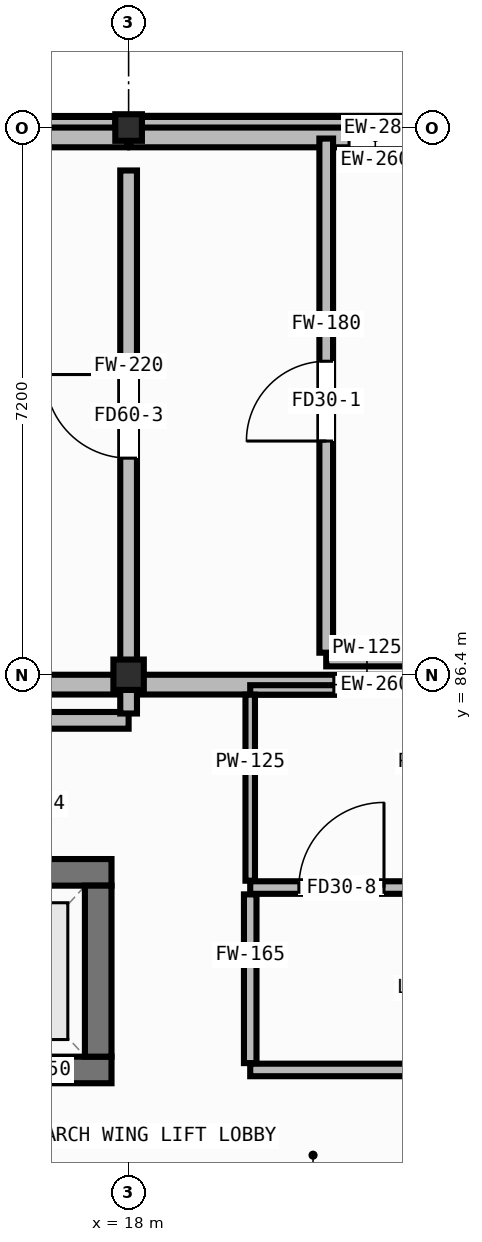
"""IFC4 building model, lengths in metres.
Left out: names, types, materials, properties, quantities, classifications, styles, units other than length and angle.
Written with IfcOpenShell. Run it as: python <this file> out.ifc"""

import sys

from ifc_helpers import new_model, si_unit, direction, frame, frame_2d, origin, origin_2d, place, context, subcontext, project, spatial, rectangle, hollow_rectangle, extrude, element, fill, save


model = new_model("IFC4")
c1 = context("Model", 3, precision=1e-05, world=origin(), true_north=direction((0.0, 1.0)))
c2 = subcontext(c1, "Body", "Model", "MODEL_VIEW")
j1 = project(units=[si_unit("LENGTHUNIT", "METRE"), si_unit("PLANEANGLEUNIT", "RADIAN")], contexts=[c1])
p1 = place(None, origin())
s1 = spatial("IfcSite", under=j1, at=p1, CompositionType="ELEMENT")
p2 = place(p1, origin())
s2 = spatial("IfcBuilding", under=s1, at=p2, CompositionType="ELEMENT")
p3 = place(p2, frame((0.0, 0.0, 20.6)))
s3 = spatial("IfcBuildingStorey", under=s2, at=p3, CompositionType="ELEMENT", Elevation=20.6)
p4 = place(p3, frame((18.0, 86.4, 0.0), z_axis=(0.0, 0.0, 1.0), x_axis=(1.0, 0.0, 0.0)))
e1 = element("IfcColumn", 1, at=p4, inside=s3, PredefinedType="COLUMN", context=c2, shape_type="SweptSolid", body=[
    extrude(hollow_rectangle(XDim=0.4, YDim=0.4, WallThickness=0.016, at=origin_2d()), origin(), (0.0, 0.0, 1.0), 3.18),
])
p5 = place(p3, frame((18.0, 93.6, 0.0), z_axis=(0.0, 0.0, 1.0), x_axis=(1.0, 0.0, 0.0)))
e2 = element("IfcColumn", 2, at=p5, inside=s3, PredefinedType="COLUMN", context=c2, shape_type="SweptSolid", body=[
    extrude(hollow_rectangle(XDim=0.35, YDim=0.35, WallThickness=0.012, at=origin_2d()), origin(), (0.0, 0.0, 1.0), 3.18),
])
p6 = place(p3, frame((17.825, 93.6, 0.0), z_axis=(0.0, 0.0, 1.0), x_axis=(-1.0, 0.0, 0.0)))
e3 = element("IfcWall", 3, at=p6, inside=s3, PredefinedType="STANDARD", context=c2, shape_type="SweptSolid", body=[
    extrude(rectangle(XDim=8.65, YDim=0.28, at=frame_2d((4.325, 0.0))), origin(), (0.0, 0.0, 1.0), 2.78),
])
p7 = place(p6, frame((3.025, 0.0, 0.85)))
e4 = element("IfcOpeningElement", 4, at=p7, cuts=e3, PredefinedType="OPENING", context=c2, shape_type="SweptSolid", body=[
    extrude(rectangle(XDim=2.6, YDim=1.6, at=frame_2d((1.3, 0.8))), frame((0.0, 0.152, 0.0), z_axis=(0.0, -1.0, 0.0), x_axis=(1.0, 0.0, 0.0)), (0.0, 0.0, 1.0), 0.304),
])
p8 = place(p3, frame((26.825, 93.6, 0.0), z_axis=(0.0, 0.0, 1.0), x_axis=(-1.0, 0.0, 0.0)))
e5 = element("IfcWall", 5, at=p8, inside=s3, PredefinedType="STANDARD", context=c2, shape_type="SweptSolid", body=[
    extrude(rectangle(XDim=8.65, YDim=0.28, at=frame_2d((4.325, 0.0))), origin(), (0.0, 0.0, 1.0), 2.78),
])
p9 = place(p8, frame((3.025, 0.0, 0.85)))
e6 = element("IfcOpeningElement", 6, at=p9, cuts=e5, PredefinedType="OPENING", context=c2, shape_type="SweptSolid", body=[
    extrude(rectangle(XDim=2.6, YDim=1.6, at=frame_2d((1.3, 0.8))), frame((0.0, 0.152, 0.0), z_axis=(0.0, -1.0, 0.0), x_axis=(1.0, 0.0, 0.0)), (0.0, 0.0, 1.0), 0.304),
])
p10 = place(p3, frame((17.98, 86.27, 3.4), z_axis=(0.0, 0.0, 1.0), x_axis=(-1.0, 0.0, 0.0)))
e7 = element("IfcWall", 7, at=p10, inside=s3, PredefinedType="STANDARD", context=c2, shape_type="SweptSolid", body=[
    extrude(rectangle(XDim=8.96, YDim=0.26, at=frame_2d((4.48, 0.0))), origin(), (0.0, 0.0, 1.0), 2.05),
])
p11 = place(p10, frame((2.68, 0.0, 0.38)))
e8 = element("IfcOpeningElement", 8, at=p11, cuts=e7, PredefinedType="OPENING", context=c2, shape_type="SweptSolid", body=[
    extrude(rectangle(XDim=3.6, YDim=1.2, at=frame_2d((1.8, 0.6))), frame((0.0, 0.142, 0.0), z_axis=(0.0, -1.0, 0.0), x_axis=(1.0, 0.0, 0.0)), (0.0, 0.0, 1.0), 0.284),
])
p12 = place(p3, frame((26.98, 86.27, 3.4), z_axis=(0.0, 0.0, 1.0), x_axis=(-1.0, 0.0, 0.0)))
e9 = element("IfcWall", 9, at=p12, inside=s3, PredefinedType="STANDARD", context=c2, shape_type="SweptSolid", body=[
    extrude(rectangle(XDim=8.96, YDim=0.26, at=frame_2d((4.48, 0.0))), origin(), (0.0, 0.0, 1.0), 2.05),
])
p13 = place(p12, frame((2.68, 0.0, 0.38)))
e10 = element("IfcOpeningElement", 10, at=p13, cuts=e9, PredefinedType="OPENING", context=c2, shape_type="SweptSolid", body=[
    extrude(rectangle(XDim=3.6, YDim=1.2, at=frame_2d((1.8, 0.6))), frame((0.0, 0.142, 0.0), z_axis=(0.0, -1.0, 0.0), x_axis=(1.0, 0.0, 0.0)), (0.0, 0.0, 1.0), 0.284),
])
p14 = place(p3, frame((17.98, 93.47, 3.4), z_axis=(0.0, 0.0, 1.0), x_axis=(-1.0, 0.0, 0.0)))
e11 = element("IfcWall", 11, at=p14, inside=s3, PredefinedType="STANDARD", context=c2, shape_type="SweptSolid", body=[
    extrude(rectangle(XDim=8.96, YDim=0.26, at=frame_2d((4.48, 0.0))), origin(), (0.0, 0.0, 1.0), 2.05),
])
p15 = place(p14, frame((2.88, 0.0, 0.38)))
e12 = element("IfcOpeningElement", 12, at=p15, cuts=e11, PredefinedType="OPENING", context=c2, shape_type="SweptSolid", body=[
    extrude(rectangle(XDim=3.2, YDim=1.1, at=frame_2d((1.6, 0.55))), frame((0.0, 0.142, 0.0), z_axis=(0.0, -1.0, 0.0), x_axis=(1.0, 0.0, 0.0)), (0.0, 0.0, 1.0), 0.284),
])
p16 = place(p3, frame((26.98, 93.47, 3.4), z_axis=(0.0, 0.0, 1.0), x_axis=(-1.0, 0.0, 0.0)))
e13 = element("IfcWall", 13, at=p16, inside=s3, PredefinedType="STANDARD", context=c2, shape_type="SweptSolid", body=[
    extrude(rectangle(XDim=8.96, YDim=0.26, at=frame_2d((4.48, 0.0))), origin(), (0.0, 0.0, 1.0), 2.05),
])
p17 = place(p16, frame((2.88, 0.0, 0.38)))
e14 = element("IfcOpeningElement", 14, at=p17, cuts=e13, PredefinedType="OPENING", context=c2, shape_type="SweptSolid", body=[
    extrude(rectangle(XDim=3.2, YDim=1.1, at=frame_2d((1.6, 0.55))), frame((0.0, 0.142, 0.0), z_axis=(0.0, -1.0, 0.0), x_axis=(1.0, 0.0, 0.0)), (0.0, 0.0, 1.0), 0.284),
])
p18 = place(p3, frame((15.025, 81.2, 0.0), z_axis=(0.0, 0.0, 1.0), x_axis=(1.0, 0.0, 0.0)))
e15 = element("IfcWall", 15, at=p18, inside=s3, PredefinedType="SHEAR", context=c2, shape_type="SweptSolid", body=[
    extrude(rectangle(XDim=2.75, YDim=0.35, at=frame_2d((1.375, 0.0))), origin(), (0.0, 0.0, 1.0), 3.18),
])
p19 = place(p18, frame((0.825, 0.0, 0.0)))
e16 = element("IfcOpeningElement", 16, at=p19, cuts=e15, PredefinedType="OPENING", context=c2, shape_type="SweptSolid", body=[
    extrude(rectangle(XDim=1.1, YDim=2.1, at=frame_2d((0.55, 1.05))), frame((0.0, 0.187, 0.0), z_axis=(0.0, -1.0, 0.0), x_axis=(1.0, 0.0, 0.0)), (0.0, 0.0, 1.0), 0.374),
])
p20 = place(p3, frame((15.025, 83.8, 0.0), z_axis=(0.0, 0.0, 1.0), x_axis=(1.0, 0.0, 0.0)))
e17 = element("IfcWall", 17, at=p20, inside=s3, PredefinedType="SHEAR", context=c2, shape_type="SweptSolid", body=[
    extrude(rectangle(XDim=2.75, YDim=0.35, at=frame_2d((1.375, 0.0))), origin(), (0.0, 0.0, 1.0), 3.18),
])
p21 = place(p3, frame((17.6, 81.375, 0.0), z_axis=(0.0, 0.0, 1.0), x_axis=(0.0, 1.0, 0.0)))
e18 = element("IfcWall", 18, at=p21, inside=s3, PredefinedType="SHEAR", context=c2, shape_type="SweptSolid", body=[
    extrude(rectangle(XDim=2.25, YDim=0.35, at=frame_2d((1.125, 0.0))), origin(), (0.0, 0.0, 1.0), 3.18),
])
p22 = place(p3, frame((19.6, 81.2, 0.0), z_axis=(0.0, 0.0, 1.0), x_axis=(1.0, 0.0, 0.0)))
e19 = element("IfcWall", 19, at=p22, inside=s3, PredefinedType="PARTITIONING", context=c2, shape_type="SweptSolid", body=[
    extrude(rectangle(XDim=7.0, YDim=0.165, at=frame_2d((3.5, 0.0))), origin(), (0.0, 0.0, 1.0), 3.18),
])
p23 = place(p22, frame((2.975, 0.0, 0.0)))
e20 = element("IfcOpeningElement", 20, at=p23, cuts=e19, PredefinedType="OPENING", context=c2, shape_type="SweptSolid", body=[
    extrude(rectangle(XDim=1.05, YDim=2.1, at=frame_2d((0.525, 1.05))), frame((0.0, 0.094, 0.0), z_axis=(0.0, -1.0, 0.0), x_axis=(1.0, 0.0, 0.0)), (0.0, 0.0, 1.0), 0.189),
])
p24 = place(p3, frame((19.6, 83.6, 0.0), z_axis=(0.0, 0.0, 1.0), x_axis=(1.0, 0.0, 0.0)))
e21 = element("IfcWall", 21, at=p24, inside=s3, PredefinedType="PARTITIONING", context=c2, shape_type="SweptSolid", body=[
    extrude(rectangle(XDim=7.0, YDim=0.165, at=frame_2d((3.5, 0.0))), origin(), (0.0, 0.0, 1.0), 3.18),
])
p25 = place(p24, frame((0.64, 0.0, 0.0)))
e22 = element("IfcOpeningElement", 22, at=p25, cuts=e21, PredefinedType="OPENING", context=c2, shape_type="SweptSolid", body=[
    extrude(rectangle(XDim=1.12, YDim=2.08, at=frame_2d((0.56, 1.04))), frame((0.0, 0.094, 0.0), z_axis=(0.0, -1.0, 0.0), x_axis=(1.0, 0.0, 0.0)), (0.0, 0.0, 1.0), 0.189),
])
p26 = place(p24, frame((3.11, 0.0, 0.0)))
e23 = element("IfcOpeningElement", 23, at=p26, cuts=e21, PredefinedType="OPENING", context=c2, shape_type="SweptSolid", body=[
    extrude(rectangle(XDim=0.98, YDim=2.02, at=frame_2d((0.49, 1.01))), frame((0.0, 0.094, 0.0), z_axis=(0.0, -1.0, 0.0), x_axis=(1.0, 0.0, 0.0)), (0.0, 0.0, 1.0), 0.189),
])
p27 = place(p24, frame((5.375, 0.0, 0.0)))
e24 = element("IfcOpeningElement", 24, at=p27, cuts=e21, PredefinedType="OPENING", context=c2, shape_type="SweptSolid", body=[
    extrude(rectangle(XDim=1.05, YDim=2.1, at=frame_2d((0.525, 1.05))), frame((0.0, 0.094, 0.0), z_axis=(0.0, -1.0, 0.0), x_axis=(1.0, 0.0, 0.0)), (0.0, 0.0, 1.0), 0.189),
])
p28 = place(p3, frame((19.6, 81.29, 0.0), z_axis=(0.0, 0.0, 1.0), x_axis=(0.0, 1.0, 0.0)))
e25 = element("IfcWall", 25, at=p28, inside=s3, PredefinedType="PARTITIONING", context=c2, shape_type="SweptSolid", body=[
    extrude(rectangle(XDim=2.22, YDim=0.165, at=frame_2d((1.11, 0.0))), origin(), (0.0, 0.0, 1.0), 3.18),
])
p29 = place(p3, frame((19.6, 86.2, 0.0), z_axis=(0.0, 0.0, 1.0), x_axis=(1.0, 0.0, 0.0)))
e26 = element("IfcWall", 26, at=p29, inside=s3, PredefinedType="PARTITIONING", context=c2, shape_type="SweptSolid", body=[
    extrude(rectangle(XDim=2.4, YDim=0.125, at=frame_2d((1.2, 0.0))), origin(), (0.0, 0.0, 1.0), 2.46),
])
p30 = place(p3, frame((19.6, 83.69, 0.0), z_axis=(0.0, 0.0, 1.0), x_axis=(0.0, 1.0, 0.0)))
e27 = element("IfcWall", 27, at=p30, inside=s3, PredefinedType="PARTITIONING", context=c2, shape_type="SweptSolid", body=[
    extrude(rectangle(XDim=2.448, YDim=0.125, at=frame_2d((1.224, 0.0))), origin(), (0.0, 0.0, 1.0), 3.18),
])
p31 = place(p3, frame((0.145, 85.8, 0.0), z_axis=(0.0, 0.0, 1.0), x_axis=(1.0, 0.0, 0.0)))
e28 = element("IfcWall", 28, at=p31, inside=s3, PredefinedType="PARTITIONING", context=c2, shape_type="SweptSolid", body=[
    extrude(rectangle(XDim=17.855, YDim=0.22, at=frame_2d((8.927, 0.0))), origin(), (0.0, 0.0, 1.0), 3.18),
])
p32 = place(p3, frame((18.0, 85.89, 0.0), z_axis=(0.0, 0.0, 1.0), x_axis=(0.0, 1.0, 0.0)))
e29 = element("IfcWall", 29, at=p32, inside=s3, PredefinedType="PARTITIONING", context=c2, shape_type="SweptSolid", body=[
    extrude(rectangle(XDim=7.145, YDim=0.22, at=frame_2d((3.573, 0.0))), origin(), (0.0, 0.0, 1.0), 2.46),
])
p33 = place(p32, frame((3.36, 0.0, 0.0)))
e30 = element("IfcOpeningElement", 30, at=p33, cuts=e29, PredefinedType="OPENING", context=c2, shape_type="SweptSolid", body=[
    extrude(rectangle(XDim=1.1, YDim=2.08, at=frame_2d((0.55, 1.04))), frame((0.0, 0.122, 0.0), z_axis=(0.0, -1.0, 0.0), x_axis=(1.0, 0.0, 0.0)), (0.0, 0.0, 1.0), 0.244),
])
p34 = place(p3, frame((20.6, 86.6, 0.0), z_axis=(0.0, 0.0, 1.0), x_axis=(1.0, 0.0, 0.0)))
e31 = element("IfcWall", 31, at=p34, inside=s3, PredefinedType="PARTITIONING", context=c2, shape_type="SweptSolid", body=[
    extrude(rectangle(XDim=14.945, YDim=0.18, at=frame_2d((7.472, 0.0))), origin(), (0.0, 0.0, 1.0), 2.46),
])
p35 = place(p3, frame((20.6, 86.69, 0.0), z_axis=(0.0, 0.0, 1.0), x_axis=(0.0, 1.0, 0.0)))
e32 = element("IfcWall", 32, at=p35, inside=s3, PredefinedType="PARTITIONING", context=c2, shape_type="SweptSolid", body=[
    extrude(rectangle(XDim=6.765, YDim=0.18, at=frame_2d((3.383, 0.0))), origin(), (0.0, 0.0, 1.0), 3.18),
])
p36 = place(p35, frame((2.785, 0.0, 0.0)))
e33 = element("IfcOpeningElement", 33, at=p36, cuts=e32, PredefinedType="OPENING", context=c2, shape_type="SweptSolid", body=[
    extrude(rectangle(XDim=1.05, YDim=2.1, at=frame_2d((0.525, 1.05))), frame((0.0, 0.102, 0.0), z_axis=(0.0, -1.0, 0.0), x_axis=(1.0, 0.0, 0.0)), (0.0, 0.0, 1.0), 0.204),
])
p37 = place(p9, origin())
e34 = element("IfcWindow", 34, at=p37, inside=s3, PartitioningType="DOUBLE_PANEL_VERTICAL", PredefinedType="WINDOW", context=c2, shape_type="SweptSolid", body=[
    extrude(rectangle(XDim=2.6, YDim=1.6, at=frame_2d((1.3, 0.8))), frame((0.0, 0.03, 0.0), z_axis=(0.0, -1.0, 0.0), x_axis=(1.0, 0.0, 0.0)), (0.0, 0.0, 1.0), 0.06),
])
fill(e6, e34)
p38 = place(p13, origin())
e35 = element("IfcWindow", 35, at=p38, inside=s3, PartitioningType="DOUBLE_PANEL_VERTICAL", PredefinedType="WINDOW", context=c2, shape_type="SweptSolid", body=[
    extrude(rectangle(XDim=3.6, YDim=1.2, at=frame_2d((1.8, 0.6))), frame((0.0, 0.03, 0.0), z_axis=(0.0, -1.0, 0.0), x_axis=(1.0, 0.0, 0.0)), (0.0, 0.0, 1.0), 0.06),
])
fill(e10, e35)
p39 = place(p17, origin())
e36 = element("IfcWindow", 36, at=p39, inside=s3, PartitioningType="DOUBLE_PANEL_VERTICAL", PredefinedType="WINDOW", context=c2, shape_type="SweptSolid", body=[
    extrude(rectangle(XDim=3.2, YDim=1.1, at=frame_2d((1.6, 0.55))), frame((0.0, 0.03, 0.0), z_axis=(0.0, -1.0, 0.0), x_axis=(1.0, 0.0, 0.0)), (0.0, 0.0, 1.0), 0.06),
])
fill(e14, e36)
p40 = place(p25, origin())
e37 = element("IfcDoor", 37, at=p40, inside=s3, OperationType="SINGLE_SWING_RIGHT", PredefinedType="DOOR", context=c2, shape_type="SweptSolid", body=[
    extrude(rectangle(XDim=1.12, YDim=2.08, at=frame_2d((0.56, 1.04))), frame((0.0, 0.025, 0.0), z_axis=(0.0, -1.0, 0.0), x_axis=(1.0, 0.0, 0.0)), (0.0, 0.0, 1.0), 0.05),
])
fill(e22, e37)
p41 = place(p33, origin())
e38 = element("IfcDoor", 38, at=p41, inside=s3, OperationType="SINGLE_SWING_RIGHT", PredefinedType="DOOR", context=c2, shape_type="SweptSolid", body=[
    extrude(rectangle(XDim=1.1, YDim=2.08, at=frame_2d((0.55, 1.04))), frame((0.0, 0.025, 0.0), z_axis=(0.0, -1.0, 0.0), x_axis=(1.0, 0.0, 0.0)), (0.0, 0.0, 1.0), 0.05),
])
fill(e30, e38)
p42 = place(p36, origin())
e39 = element("IfcDoor", 39, at=p42, inside=s3, OperationType="SINGLE_SWING_LEFT", PredefinedType="DOOR", context=c2, shape_type="SweptSolid", body=[
    extrude(rectangle(XDim=1.05, YDim=2.1, at=frame_2d((0.525, 1.05))), frame((0.0, 0.025, 0.0), z_axis=(0.0, -1.0, 0.0), x_axis=(1.0, 0.0, 0.0)), (0.0, 0.0, 1.0), 0.05),
])
fill(e33, e39)
save(model, sys.argv[1])
